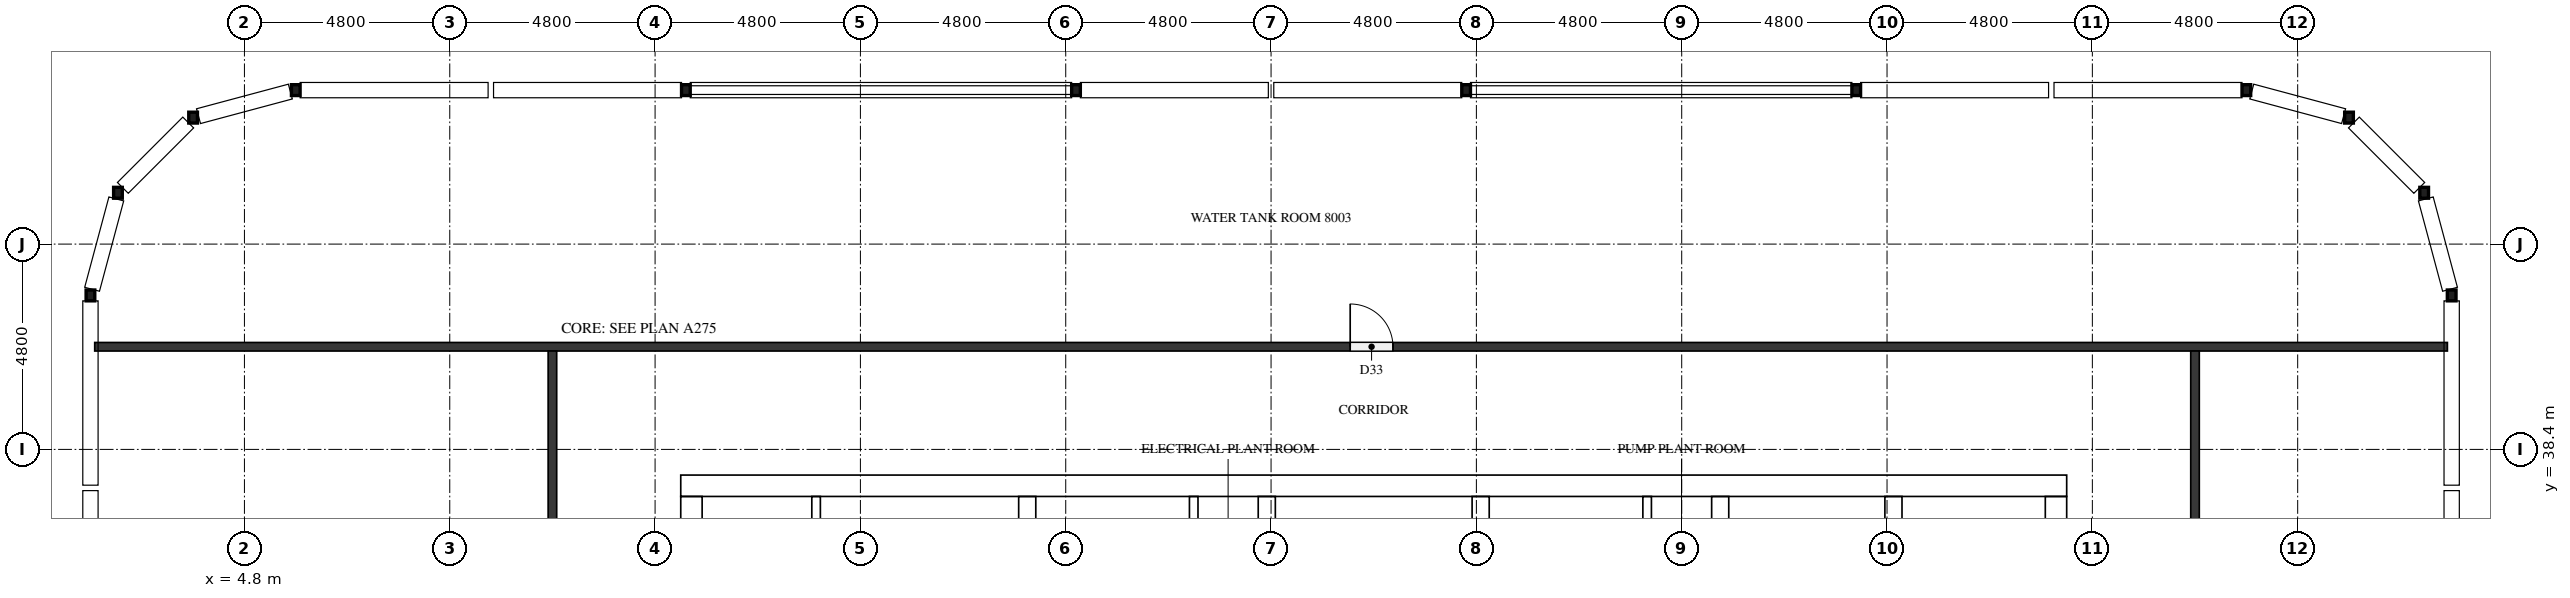
"""IFC4 building model, lengths in metres.
Left out: names, types, materials, properties, quantities, classifications, styles, units other than length and angle.
Written with IfcOpenShell. Run it as: python <this file> out.ifc"""

import sys

from ifc_helpers import new_model, si_unit, direction, frame, frame_2d, origin, origin_2d, place, context, subcontext, project, spatial, rectangle, hollow_rectangle, extrude, element, fill, save


model = new_model("IFC4")
c1 = context("Model", 3, precision=1e-05, world=origin(), true_north=direction((0.0, 1.0)))
c2 = subcontext(c1, "Body", "Model", "MODEL_VIEW")
j1 = project(units=[si_unit("LENGTHUNIT", "METRE"), si_unit("PLANEANGLEUNIT", "RADIAN")], contexts=[c1])
p1 = place(None, origin())
s1 = spatial("IfcSite", under=j1, at=p1, CompositionType="ELEMENT")
p2 = place(p1, origin())
s2 = spatial("IfcBuilding", under=s1, at=p2, CompositionType="ELEMENT")
p3 = place(p2, frame((0.0, 0.0, 310.1)))
s3 = spatial("IfcBuildingStorey", under=s2, at=p3, CompositionType="ELEMENT", Elevation=310.1)
p4 = place(p3, frame((15.0, 37.55, 0.0), z_axis=(0.0, 0.0, 1.0), x_axis=(1.0, 0.0, 0.0)))
e1 = element("IfcWall", 1, at=p4, inside=s3, PredefinedType="SHEAR", context=c2, shape_type="SweptSolid", body=[
    extrude(rectangle(XDim=32.4, YDim=0.5, at=frame_2d((16.2, 0.0))), origin(), (0.0, 0.0, 1.0), 3.8),
])
p5 = place(p4, frame((15.3, 0.0, 0.0)))
e2 = element("IfcOpeningElement", 2, at=p5, cuts=e1, PredefinedType="OPENING", context=c2, shape_type="SweptSolid", body=[
    extrude(rectangle(XDim=1.8, YDim=2.1, at=frame_2d((0.9, 1.05))), frame((0.0, 0.26, 0.0), z_axis=(0.0, -1.0, 0.0), x_axis=(1.0, 0.0, 0.0)), (0.0, 0.0, 1.0), 0.52),
])
p6 = place(p4, frame((1.282, 0.0, 0.0)))
e3 = element("IfcOpeningElement", 3, at=p6, cuts=e1, PredefinedType="OPENING", context=c2, shape_type="SweptSolid", body=[
    extrude(rectangle(XDim=1.0, YDim=2.1, at=frame_2d((0.5, 1.05))), frame((0.0, 0.26, 0.0), z_axis=(0.0, -1.0, 0.0), x_axis=(1.0, 0.0, 0.0)), (0.0, 0.0, 1.0), 0.52),
])
p7 = place(p4, frame((5.082, 0.0, 0.0)))
e4 = element("IfcOpeningElement", 4, at=p7, cuts=e1, PredefinedType="OPENING", context=c2, shape_type="SweptSolid", body=[
    extrude(rectangle(XDim=1.0, YDim=2.1, at=frame_2d((0.5, 1.05))), frame((0.0, 0.26, 0.0), z_axis=(0.0, -1.0, 0.0), x_axis=(1.0, 0.0, 0.0)), (0.0, 0.0, 1.0), 0.52),
])
p8 = place(p3, frame((15.25, 15.5, 0.0), z_axis=(0.0, 0.0, 1.0), x_axis=(0.0, 1.0, 0.0)))
e5 = element("IfcWall", 5, at=p8, inside=s3, PredefinedType="SHEAR", context=c2, shape_type="SweptSolid", body=[
    extrude(rectangle(XDim=21.8, YDim=0.5, at=frame_2d((10.9, 0.0))), origin(), (0.0, 0.0, 1.0), 3.8),
])
p9 = place(p8, frame((5.26, 0.0, 0.0)))
e6 = element("IfcOpeningElement", 6, at=p9, cuts=e5, PredefinedType="OPENING", context=c2, shape_type="SweptSolid", body=[
    extrude(rectangle(XDim=1.2, YDim=2.1, at=frame_2d((0.6, 1.05))), frame((0.0, 0.26, 0.0), z_axis=(0.0, -1.0, 0.0), x_axis=(1.0, 0.0, 0.0)), (0.0, 0.0, 1.0), 0.52),
])
p10 = place(p3, frame((47.15, 15.5, 0.0), z_axis=(0.0, 0.0, 1.0), x_axis=(0.0, 1.0, 0.0)))
e7 = element("IfcWall", 7, at=p10, inside=s3, PredefinedType="SHEAR", context=c2, shape_type="SweptSolid", body=[
    extrude(rectangle(XDim=21.8, YDim=0.5, at=frame_2d((10.9, 0.0))), origin(), (0.0, 0.0, 1.0), 3.8),
])
p11 = place(p10, frame((10.6, 0.0, 0.0)))
e8 = element("IfcOpeningElement", 8, at=p11, cuts=e7, PredefinedType="OPENING", context=c2, shape_type="SweptSolid", body=[
    extrude(rectangle(XDim=1.2, YDim=2.1, at=frame_2d((0.6, 1.05))), frame((0.0, 0.26, 0.0), z_axis=(0.0, -1.0, 0.0), x_axis=(1.0, 0.0, 0.0)), (0.0, 0.0, 1.0), 0.52),
])
p12 = place(p3, frame((23.1, 15.5, 0.0), z_axis=(0.0, 0.0, 1.0), x_axis=(0.0, 1.0, 0.0)))
e9 = element("IfcWall", 9, at=p12, inside=s3, PredefinedType="SHEAR", context=c2, shape_type="SweptSolid", body=[
    extrude(rectangle(XDim=21.8, YDim=0.4, at=frame_2d((10.9, 0.0))), origin(), (0.0, 0.0, 1.0), 3.8),
])
p13 = place(p3, frame((39.3, 27.75, 0.0), z_axis=(0.0, 0.0, 1.0), x_axis=(0.0, 1.0, 0.0)))
e10 = element("IfcWall", 10, at=p13, inside=s3, PredefinedType="SHEAR", context=c2, shape_type="SweptSolid", body=[
    extrude(rectangle(XDim=9.55, YDim=0.4, at=frame_2d((4.775, 0.0))), origin(), (0.0, 0.0, 1.0), 3.8),
])
p14 = place(p3, frame((43.35, 27.75, 0.0), z_axis=(0.0, 0.0, 1.0), x_axis=(0.0, 1.0, 0.0)))
e11 = element("IfcWall", 11, at=p14, inside=s3, PredefinedType="SHEAR", context=c2, shape_type="SweptSolid", body=[
    extrude(rectangle(XDim=9.55, YDim=0.4, at=frame_2d((4.775, 0.0))), origin(), (0.0, 0.0, 1.0), 3.8),
])
p15 = place(p14, frame((7.65, 0.0, 0.0)))
e12 = element("IfcOpeningElement", 12, at=p15, cuts=e11, PredefinedType="OPENING", context=c2, shape_type="SweptSolid", body=[
    extrude(rectangle(XDim=1.2, YDim=2.1, at=frame_2d((0.6, 1.05))), frame((0.0, 0.21, 0.0), z_axis=(0.0, -1.0, 0.0), x_axis=(1.0, 0.0, 0.0)), (0.0, 0.0, 1.0), 0.42),
])
for number, where, z_axis, x_axis in (
    (13, (28.7, 33.75, 0.0), (0.0, 0.0, 1.0), (0.0, 1.0, 0.0)),
    (14, (33.7, 33.75, 0.0), (0.0, 0.0, 1.0), (0.0, 1.0, 0.0)),
):
    element("IfcWall", number, at=place(p3, frame(where, z_axis=z_axis, x_axis=x_axis)), inside=s3, PredefinedType="SHEAR", context=c2, shape_type="SweptSolid", body=[
        extrude(rectangle(XDim=3.55, YDim=0.4, at=frame_2d((1.775, 0.0))), origin(), (0.0, 0.0, 1.0), 3.8),
    ])
for number, where, z_axis, x_axis in (
    (15, (56.4, 42.0, 0.0), (0.0, 0.0, 1.0), (1.0, 0.0, 0.0)),
    (16, (55.757, 44.4, 0.0), (0.0, 0.0, 1.0), (1.0, 0.0, 0.0)),
    (17, (54.0, 46.157, 0.0), (0.0, 0.0, 1.0), (1.0, 0.0, 0.0)),
    (18, (51.6, 46.8, 0.0), (0.0, 0.0, 1.0), (1.0, 0.0, 0.0)),
    (19, (42.48, 46.8, 0.0), (0.0, 0.0, 1.0), (1.0, 0.0, 0.0)),
    (20, (33.36, 46.8, 0.0), (0.0, 0.0, 1.0), (1.0, 0.0, 0.0)),
    (21, (24.24, 46.8, 0.0), (0.0, 0.0, 1.0), (1.0, 0.0, 0.0)),
    (22, (15.12, 46.8, 0.0), (0.0, 0.0, 1.0), (1.0, 0.0, 0.0)),
    (23, (6.0, 46.8, 0.0), (0.0, 0.0, 1.0), (1.0, 0.0, 0.0)),
    (24, (3.6, 46.157, 0.0), (0.0, 0.0, 1.0), (1.0, 0.0, 0.0)),
    (25, (1.843, 44.4, 0.0), (0.0, 0.0, 1.0), (1.0, 0.0, 0.0)),
    (26, (1.2, 42.0, 0.0), (0.0, 0.0, 1.0), (1.0, 0.0, 0.0)),
):
    element("IfcColumn", number, at=place(p3, frame(where, z_axis=z_axis, x_axis=x_axis)), inside=s3, PredefinedType="COLUMN", context=c2, shape_type="SweptSolid", body=[
        extrude(hollow_rectangle(XDim=0.203, YDim=0.254, WallThickness=0.01, InnerFilletRadius=0.004, OuterFilletRadius=0.013, at=origin_2d()), origin(), (0.0, 0.0, 1.0), 3.8),
    ])
p16 = place(p3, frame((18.164, 31.45, 0.0), z_axis=(0.0, 0.0, 1.0), x_axis=(0.0, 1.0, 0.0)))
e27 = element("IfcWall", 27, at=p16, inside=s3, PredefinedType="PARTITIONING", context=c2, shape_type="SweptSolid", body=[
    extrude(rectangle(XDim=5.85, YDim=0.2, at=frame_2d((2.925, 0.0))), origin(), (0.0, 0.0, 1.0), 3.8),
])
for number, where, z_axis, x_axis in (
    (28, (26.992, 33.75, 0.0), (0.0, 0.0, 1.0), (0.0, 1.0, 0.0)),
    (29, (37.592, 33.75, 0.0), (0.0, 0.0, 1.0), (0.0, 1.0, 0.0)),
):
    element("IfcWall", number, at=place(p3, frame(where, z_axis=z_axis, x_axis=x_axis)), inside=s3, PredefinedType="PARTITIONING", context=c2, shape_type="SweptSolid", body=[
        extrude(rectangle(XDim=3.55, YDim=0.2, at=frame_2d((1.775, 0.0))), origin(), (0.0, 0.0, 1.0), 3.8),
    ])
p17 = place(p3, frame((1.3, 40.8, 0.0), z_axis=(0.0, 0.0, 1.0), x_axis=(1.0, 0.0, 0.0)))
e30 = element("IfcWall", 30, at=p17, inside=s3, PredefinedType="PARTITIONING", context=c2, shape_type="SweptSolid", body=[
    extrude(rectangle(XDim=55.0, YDim=0.2, at=frame_2d((27.5, 0.0))), origin(), (0.0, 0.0, 1.0), 3.8),
])
p18 = place(p17, frame((29.35, 0.0, 0.0)))
e31 = element("IfcOpeningElement", 31, at=p18, cuts=e30, PredefinedType="OPENING", context=c2, shape_type="SweptSolid", body=[
    extrude(rectangle(XDim=1.0, YDim=2.1, at=frame_2d((0.5, 1.05))), frame((0.0, 0.11, 0.0), z_axis=(0.0, -1.0, 0.0), x_axis=(1.0, 0.0, 0.0)), (0.0, 0.0, 1.0), 0.22),
])
p19 = place(p3, frame((12.0, 12.1, 0.0), z_axis=(0.0, 0.0, 1.0), x_axis=(0.0, 1.0, 0.0)))
e32 = element("IfcWall", 32, at=p19, inside=s3, PredefinedType="PARTITIONING", context=c2, shape_type="SweptSolid", body=[
    extrude(rectangle(XDim=28.6, YDim=0.2, at=frame_2d((14.3, 0.0))), origin(), (0.0, 0.0, 1.0), 3.8),
])
p20 = place(p19, frame((13.75, 0.0, 0.0)))
e33 = element("IfcOpeningElement", 33, at=p20, cuts=e32, PredefinedType="OPENING", context=c2, shape_type="SweptSolid", body=[
    extrude(rectangle(XDim=1.0, YDim=2.1, at=frame_2d((0.5, 1.05))), frame((0.0, 0.11, 0.0), z_axis=(0.0, -1.0, 0.0), x_axis=(1.0, 0.0, 0.0)), (0.0, 0.0, 1.0), 0.22),
])
p21 = place(p3, frame((50.4, 40.7, 0.0), z_axis=(0.0, 0.0, 1.0), x_axis=(0.0, -1.0, 0.0)))
e34 = element("IfcWall", 34, at=p21, inside=s3, PredefinedType="PARTITIONING", context=c2, shape_type="SweptSolid", body=[
    extrude(rectangle(XDim=28.6, YDim=0.2, at=frame_2d((14.3, 0.0))), origin(), (0.0, 0.0, 1.0), 3.8),
])
p22 = place(p21, frame((13.75, 0.0, 0.0)))
e35 = element("IfcOpeningElement", 35, at=p22, cuts=e34, PredefinedType="OPENING", context=c2, shape_type="SweptSolid", body=[
    extrude(rectangle(XDim=1.0, YDim=2.1, at=frame_2d((0.5, 1.05))), frame((0.0, 0.11, 0.0), z_axis=(0.0, -1.0, 0.0), x_axis=(1.0, 0.0, 0.0)), (0.0, 0.0, 1.0), 0.22),
])
p23 = place(p5, origin())
e36 = element("IfcDoor", 36, at=p23, inside=s3, OperationType="DOUBLE_DOOR_SINGLE_SWING", PredefinedType="DOOR", context=c2, shape_type="SweptSolid", body=[
    extrude(rectangle(XDim=1.8, YDim=2.1, at=frame_2d((0.9, 1.05))), frame((0.0, 0.025, 0.0), z_axis=(0.0, -1.0, 0.0), x_axis=(1.0, 0.0, 0.0)), (0.0, 0.0, 1.0), 0.05),
])
fill(e2, e36)
p24 = place(p6, origin())
e37 = element("IfcDoor", 37, at=p24, inside=s3, OperationType="SINGLE_SWING_LEFT", PredefinedType="DOOR", context=c2, shape_type="SweptSolid", body=[
    extrude(rectangle(XDim=1.0, YDim=2.1, at=frame_2d((0.5, 1.05))), frame((0.0, 0.025, 0.0), z_axis=(0.0, -1.0, 0.0), x_axis=(1.0, 0.0, 0.0)), (0.0, 0.0, 1.0), 0.05),
])
fill(e3, e37)
p25 = place(p7, origin())
e38 = element("IfcDoor", 38, at=p25, inside=s3, OperationType="SINGLE_SWING_RIGHT", PredefinedType="DOOR", context=c2, shape_type="SweptSolid", body=[
    extrude(rectangle(XDim=1.0, YDim=2.1, at=frame_2d((0.5, 1.05))), frame((0.0, 0.025, 0.0), z_axis=(0.0, -1.0, 0.0), x_axis=(1.0, 0.0, 0.0)), (0.0, 0.0, 1.0), 0.05),
])
fill(e4, e38)
p26 = place(p18, origin())
e39 = element("IfcDoor", 39, at=p26, inside=s3, OperationType="SINGLE_SWING_LEFT", PredefinedType="DOOR", context=c2, shape_type="SweptSolid", body=[
    extrude(rectangle(XDim=1.0, YDim=2.1, at=frame_2d((0.5, 1.05))), frame((0.0, 0.025, 0.0), z_axis=(0.0, -1.0, 0.0), x_axis=(1.0, 0.0, 0.0)), (0.0, 0.0, 1.0), 0.05),
])
fill(e31, e39)
save(model, sys.argv[1])
